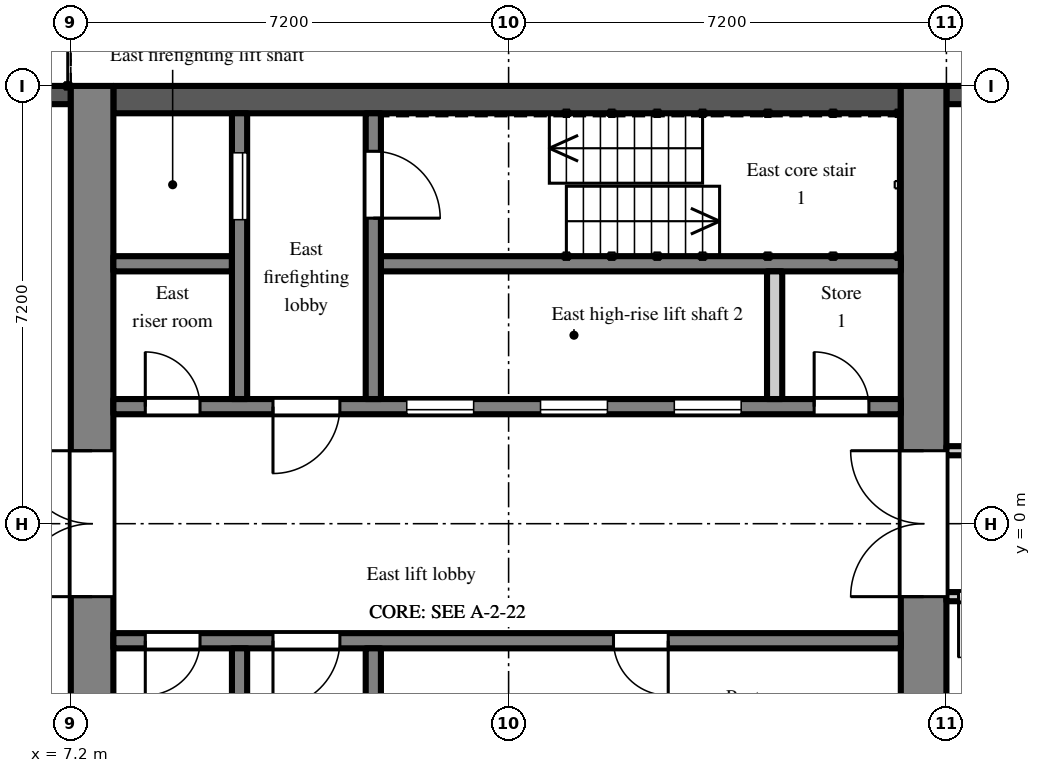
"""IFC4 building model, lengths in metres.
Left out: names, types, materials, properties, quantities, classifications, styles, units other than length and angle.
Written with IfcOpenShell. Run it as: python <this file> out.ifc"""

import sys

from ifc_helpers import new_model, si_unit, direction, frame, frame_2d, origin, place, context, subcontext, project, spatial, rectangle, extrude, element, fill, save


model = new_model("IFC4")
c1 = context("Model", 3, precision=1e-05, world=origin(), true_north=direction((0.0, 1.0)))
c2 = subcontext(c1, "Body", "Model", "MODEL_VIEW")
j1 = project(units=[si_unit("LENGTHUNIT", "METRE"), si_unit("PLANEANGLEUNIT", "RADIAN")], contexts=[c1])
p1 = place(None, origin())
s1 = spatial("IfcSite", under=j1, at=p1, CompositionType="ELEMENT")
p2 = place(p1, origin())
s2 = spatial("IfcBuilding", under=s1, at=p2, CompositionType="ELEMENT")
p3 = place(p2, frame((0.0, 0.0, 129.3)))
s3 = spatial("IfcBuildingStorey", under=s2, at=p3, CompositionType="ELEMENT", Elevation=129.3)
p4 = place(p3, frame((24.3, 7.05, 0.0), z_axis=(0.0, 0.0, 1.0), x_axis=(-1.0, 0.0, 0.0)))
e1 = element("IfcWall", 1, at=p4, inside=s3, PredefinedType="SOLIDWALL", context=c2, shape_type="SweptSolid", body=[
    extrude(rectangle(XDim=2.7, YDim=0.3, at=frame_2d((1.35, 0.0))), origin(), (0.0, 0.0, 1.0), 2.2),
])
p5 = place(p4, frame((0.75, 0.0, 0.2)))
e2 = element("IfcOpeningElement", 2, at=p5, cuts=e1, PredefinedType="OPENING", context=c2, shape_type="SweptSolid", body=[
    extrude(rectangle(XDim=1.2, YDim=1.85, at=frame_2d((0.6, 0.925))), frame((0.0, 0.16, 0.0), z_axis=(0.0, -1.0, 0.0), x_axis=(1.0, 0.0, 0.0)), (0.0, 0.0, 1.0), 0.32),
])
p6 = place(p3, frame((7.2, 7.05, 0.0), z_axis=(0.0, 0.0, 1.0), x_axis=(-1.0, 0.0, 0.0)))
e3 = element("IfcWall", 3, at=p6, inside=s3, PredefinedType="SOLIDWALL", context=c2, shape_type="SweptSolid", body=[
    extrude(rectangle(XDim=3.0, YDim=0.3, at=frame_2d((1.5, 0.0))), origin(), (0.0, 0.0, 1.0), 2.2),
])
p7 = place(p3, frame((7.55, -7.2, 0.0), z_axis=(0.0, 0.0, 1.0), x_axis=(0.0, 1.0, 0.0)))
e4 = element("IfcWall", 4, at=p7, inside=s3, PredefinedType="SHEAR", context=c2, shape_type="SweptSolid", body=[
    extrude(rectangle(XDim=14.4, YDim=0.7, at=frame_2d((7.2, 0.0))), origin(), (0.0, 0.0, 1.0), 2.6),
])
p8 = place(p7, frame((6.0, 0.0, 0.0)))
e5 = element("IfcOpeningElement", 5, at=p8, cuts=e4, PredefinedType="OPENING", context=c2, shape_type="SweptSolid", body=[
    extrude(rectangle(XDim=2.4, YDim=2.2, at=frame_2d((1.2, 1.1))), frame((0.0, 0.36, 0.0), z_axis=(0.0, -1.0, 0.0), x_axis=(1.0, 0.0, 0.0)), (0.0, 0.0, 1.0), 0.72),
])
p9 = place(p3, frame((21.225, -7.2, 0.0), z_axis=(0.0, 0.0, 1.0), x_axis=(0.0, 1.0, 0.0)))
e6 = element("IfcWall", 6, at=p9, inside=s3, PredefinedType="SHEAR", context=c2, shape_type="SweptSolid", body=[
    extrude(rectangle(XDim=14.4, YDim=0.75, at=frame_2d((7.2, 0.0))), origin(), (0.0, 0.0, 1.0), 2.6),
])
p10 = place(p9, frame((6.0, 0.0, 0.0)))
e7 = element("IfcOpeningElement", 7, at=p10, cuts=e6, PredefinedType="OPENING", context=c2, shape_type="SweptSolid", body=[
    extrude(rectangle(XDim=2.4, YDim=2.2, at=frame_2d((1.2, 1.1))), frame((0.0, 0.385, 0.0), z_axis=(0.0, -1.0, 0.0), x_axis=(1.0, 0.0, 0.0)), (0.0, 0.0, 1.0), 0.77),
])
p11 = place(p3, frame((7.9, 6.975, 0.0), z_axis=(0.0, 0.0, 1.0), x_axis=(1.0, 0.0, 0.0)))
e8 = element("IfcWall", 8, at=p11, inside=s3, PredefinedType="SHEAR", context=c2, shape_type="SweptSolid", body=[
    extrude(rectangle(XDim=12.95, YDim=0.45, at=frame_2d((6.475, 0.0))), origin(), (0.0, 0.0, 1.0), 2.6),
])
p12 = place(p3, frame((7.9, 1.925, 0.0), z_axis=(0.0, 0.0, 1.0), x_axis=(1.0, 0.0, 0.0)))
e9 = element("IfcWall", 9, at=p12, inside=s3, PredefinedType="SHEAR", context=c2, shape_type="SweptSolid", body=[
    extrude(rectangle(XDim=12.95, YDim=0.25, at=frame_2d((6.475, 0.0))), origin(), (0.0, 0.0, 1.0), 2.6),
])
p13 = place(p12, frame((4.825, 0.0, 0.0)))
e10 = element("IfcOpeningElement", 10, at=p13, cuts=e9, PredefinedType="OPENING", context=c2, shape_type="SweptSolid", body=[
    extrude(rectangle(XDim=1.1, YDim=2.1, at=frame_2d((0.55, 1.05))), frame((0.0, 0.135, 0.0), z_axis=(0.0, -1.0, 0.0), x_axis=(1.0, 0.0, 0.0)), (0.0, 0.0, 1.0), 0.27),
])
p14 = place(p12, frame((7.025, 0.0, 0.0)))
e11 = element("IfcOpeningElement", 11, at=p14, cuts=e9, PredefinedType="OPENING", context=c2, shape_type="SweptSolid", body=[
    extrude(rectangle(XDim=1.1, YDim=2.1, at=frame_2d((0.55, 1.05))), frame((0.0, 0.135, 0.0), z_axis=(0.0, -1.0, 0.0), x_axis=(1.0, 0.0, 0.0)), (0.0, 0.0, 1.0), 0.27),
])
p15 = place(p12, frame((9.225, 0.0, 0.0)))
e12 = element("IfcOpeningElement", 12, at=p15, cuts=e9, PredefinedType="OPENING", context=c2, shape_type="SweptSolid", body=[
    extrude(rectangle(XDim=1.1, YDim=2.1, at=frame_2d((0.55, 1.05))), frame((0.0, 0.135, 0.0), z_axis=(0.0, -1.0, 0.0), x_axis=(1.0, 0.0, 0.0)), (0.0, 0.0, 1.0), 0.27),
])
p16 = place(p12, frame((0.525, 0.0, 0.0)))
e13 = element("IfcOpeningElement", 13, at=p16, cuts=e9, PredefinedType="OPENING", context=c2, shape_type="SweptSolid", body=[
    extrude(rectangle(XDim=0.9, YDim=2.1, at=frame_2d((0.45, 1.05))), frame((0.0, 0.135, 0.0), z_axis=(0.0, -1.0, 0.0), x_axis=(1.0, 0.0, 0.0)), (0.0, 0.0, 1.0), 0.27),
])
p17 = place(p12, frame((2.625, 0.0, 0.0)))
e14 = element("IfcOpeningElement", 14, at=p17, cuts=e9, PredefinedType="OPENING", context=c2, shape_type="SweptSolid", body=[
    extrude(rectangle(XDim=1.1, YDim=2.1, at=frame_2d((0.55, 1.05))), frame((0.0, 0.135, 0.0), z_axis=(0.0, -1.0, 0.0), x_axis=(1.0, 0.0, 0.0)), (0.0, 0.0, 1.0), 0.27),
])
p18 = place(p12, frame((11.525, 0.0, 0.0)))
e15 = element("IfcOpeningElement", 15, at=p18, cuts=e9, PredefinedType="OPENING", context=c2, shape_type="SweptSolid", body=[
    extrude(rectangle(XDim=0.9, YDim=2.1, at=frame_2d((0.45, 1.05))), frame((0.0, 0.135, 0.0), z_axis=(0.0, -1.0, 0.0), x_axis=(1.0, 0.0, 0.0)), (0.0, 0.0, 1.0), 0.27),
])
p19 = place(p3, frame((7.9, 4.275, 0.0), z_axis=(0.0, 0.0, 1.0), x_axis=(1.0, 0.0, 0.0)))
e16 = element("IfcWall", 16, at=p19, inside=s3, PredefinedType="SHEAR", context=c2, shape_type="SweptSolid", body=[
    extrude(rectangle(XDim=1.95, YDim=0.25, at=frame_2d((0.975, 0.0))), origin(), (0.0, 0.0, 1.0), 2.6),
])
p20 = place(p3, frame((12.3, 4.275, 0.0), z_axis=(0.0, 0.0, 1.0), x_axis=(1.0, 0.0, 0.0)))
e17 = element("IfcWall", 17, at=p20, inside=s3, PredefinedType="SHEAR", context=c2, shape_type="SweptSolid", body=[
    extrude(rectangle(XDim=8.55, YDim=0.25, at=frame_2d((4.275, 0.0))), origin(), (0.0, 0.0, 1.0), 2.6),
])
p21 = place(p3, frame((9.975, 2.05, 0.0), z_axis=(0.0, 0.0, 1.0), x_axis=(0.0, 1.0, 0.0)))
e18 = element("IfcWall", 18, at=p21, inside=s3, PredefinedType="SHEAR", context=c2, shape_type="SweptSolid", body=[
    extrude(rectangle(XDim=4.7, YDim=0.25, at=frame_2d((2.35, 0.0))), origin(), (0.0, 0.0, 1.0), 2.6),
])
p22 = place(p21, frame((2.95, 0.0, 0.0)))
e19 = element("IfcOpeningElement", 19, at=p22, cuts=e18, PredefinedType="OPENING", context=c2, shape_type="SweptSolid", body=[
    extrude(rectangle(XDim=1.1, YDim=2.1, at=frame_2d((0.55, 1.05))), frame((0.0, 0.135, 0.0), z_axis=(0.0, -1.0, 0.0), x_axis=(1.0, 0.0, 0.0)), (0.0, 0.0, 1.0), 0.27),
])
p23 = place(p3, frame((12.175, 2.05, 0.0), z_axis=(0.0, 0.0, 1.0), x_axis=(0.0, 1.0, 0.0)))
e20 = element("IfcWall", 20, at=p23, inside=s3, PredefinedType="SHEAR", context=c2, shape_type="SweptSolid", body=[
    extrude(rectangle(XDim=4.7, YDim=0.25, at=frame_2d((2.35, 0.0))), origin(), (0.0, 0.0, 1.0), 2.6),
])
p24 = place(p23, frame((2.975, 0.0, 0.0)))
e21 = element("IfcOpeningElement", 21, at=p24, cuts=e20, PredefinedType="OPENING", context=c2, shape_type="SweptSolid", body=[
    extrude(rectangle(XDim=1.1, YDim=2.1, at=frame_2d((0.55, 1.05))), frame((0.0, 0.135, 0.0), z_axis=(0.0, -1.0, 0.0), x_axis=(1.0, 0.0, 0.0)), (0.0, 0.0, 1.0), 0.27),
])
p25 = place(p3, frame((18.775, 2.05, 0.0), z_axis=(0.0, 0.0, 1.0), x_axis=(0.0, 1.0, 0.0)))
e22 = element("IfcWall", 22, at=p25, inside=s3, PredefinedType="PARTITIONING", context=c2, shape_type="SweptSolid", body=[
    extrude(rectangle(XDim=2.1, YDim=0.25, at=frame_2d((1.05, 0.0))), origin(), (0.0, 0.0, 1.0), 2.6),
])
p26 = place(p3, frame((7.9, -1.925, 0.0), z_axis=(0.0, 0.0, 1.0), x_axis=(1.0, 0.0, 0.0)))
e23 = element("IfcWall", 23, at=p26, inside=s3, PredefinedType="SHEAR", context=c2, shape_type="SweptSolid", body=[
    extrude(rectangle(XDim=12.95, YDim=0.25, at=frame_2d((6.475, 0.0))), origin(), (0.0, 0.0, 1.0), 2.6),
])
p27 = place(p26, frame((0.525, 0.0, 0.0)))
e24 = element("IfcOpeningElement", 24, at=p27, cuts=e23, PredefinedType="OPENING", context=c2, shape_type="SweptSolid", body=[
    extrude(rectangle(XDim=0.9, YDim=2.1, at=frame_2d((0.45, 1.05))), frame((0.0, 0.135, 0.0), z_axis=(0.0, -1.0, 0.0), x_axis=(1.0, 0.0, 0.0)), (0.0, 0.0, 1.0), 0.27),
])
p28 = place(p26, frame((2.625, 0.0, 0.0)))
e25 = element("IfcOpeningElement", 25, at=p28, cuts=e23, PredefinedType="OPENING", context=c2, shape_type="SweptSolid", body=[
    extrude(rectangle(XDim=1.1, YDim=2.1, at=frame_2d((0.55, 1.05))), frame((0.0, 0.135, 0.0), z_axis=(0.0, -1.0, 0.0), x_axis=(1.0, 0.0, 0.0)), (0.0, 0.0, 1.0), 0.27),
])
p29 = place(p26, frame((8.225, 0.0, 0.0)))
e26 = element("IfcOpeningElement", 26, at=p29, cuts=e23, PredefinedType="OPENING", context=c2, shape_type="SweptSolid", body=[
    extrude(rectangle(XDim=0.9, YDim=2.1, at=frame_2d((0.45, 1.05))), frame((0.0, 0.135, 0.0), z_axis=(0.0, -1.0, 0.0), x_axis=(1.0, 0.0, 0.0)), (0.0, 0.0, 1.0), 0.27),
])
p30 = place(p3, frame((9.975, -2.05, 0.0), z_axis=(0.0, 0.0, 1.0), x_axis=(0.0, -1.0, 0.0)))
e27 = element("IfcWall", 27, at=p30, inside=s3, PredefinedType="SHEAR", context=c2, shape_type="SweptSolid", body=[
    extrude(rectangle(XDim=4.7, YDim=0.25, at=frame_2d((2.35, 0.0))), origin(), (0.0, 0.0, 1.0), 2.6),
])
p31 = place(p30, frame((2.95, 0.0, 0.0)))
e28 = element("IfcOpeningElement", 28, at=p31, cuts=e27, PredefinedType="OPENING", context=c2, shape_type="SweptSolid", body=[
    extrude(rectangle(XDim=1.1, YDim=2.1, at=frame_2d((0.55, 1.05))), frame((0.0, 0.135, 0.0), z_axis=(0.0, -1.0, 0.0), x_axis=(1.0, 0.0, 0.0)), (0.0, 0.0, 1.0), 0.27),
])
p32 = place(p3, frame((12.175, -2.05, 0.0), z_axis=(0.0, 0.0, 1.0), x_axis=(0.0, -1.0, 0.0)))
e29 = element("IfcWall", 29, at=p32, inside=s3, PredefinedType="SHEAR", context=c2, shape_type="SweptSolid", body=[
    extrude(rectangle(XDim=4.7, YDim=0.25, at=frame_2d((2.35, 0.0))), origin(), (0.0, 0.0, 1.0), 2.6),
])
p33 = place(p32, frame((2.975, 0.0, 0.0)))
e30 = element("IfcOpeningElement", 30, at=p33, cuts=e29, PredefinedType="OPENING", context=c2, shape_type="SweptSolid", body=[
    extrude(rectangle(XDim=1.1, YDim=2.1, at=frame_2d((0.55, 1.05))), frame((0.0, 0.135, 0.0), z_axis=(0.0, -1.0, 0.0), x_axis=(1.0, 0.0, 0.0)), (0.0, 0.0, 1.0), 0.27),
])
p34 = place(p3, frame((21.6, -1.2, 0.0), z_axis=(0.0, 0.0, 1.0), x_axis=(1.0, 0.0, 0.0)))
e31 = element("IfcWall", 31, at=p34, inside=s3, PredefinedType="PARTITIONING", context=c2, shape_type="SweptSolid", body=[
    extrude(rectangle(XDim=14.9, YDim=0.15, at=frame_2d((7.45, 0.0))), origin(), (0.0, 0.0, 1.0), 2.6),
])
p35 = place(p34, frame((0.2, 0.0, 0.0)))
e32 = element("IfcOpeningElement", 32, at=p35, cuts=e31, PredefinedType="OPENING", context=c2, shape_type="SweptSolid", body=[
    extrude(rectangle(XDim=1.0, YDim=2.1, at=frame_2d((0.5, 1.05))), frame((0.0, 0.085, 0.0), z_axis=(0.0, -1.0, 0.0), x_axis=(1.0, 0.0, 0.0)), (0.0, 0.0, 1.0), 0.17),
])
p36 = place(p34, frame((5.71, 0.0, 0.0)))
e33 = element("IfcOpeningElement", 33, at=p36, cuts=e31, PredefinedType="OPENING", context=c2, shape_type="SweptSolid", body=[
    extrude(rectangle(XDim=1.0, YDim=2.1, at=frame_2d((0.5, 1.05))), frame((0.0, 0.085, 0.0), z_axis=(0.0, -1.0, 0.0), x_axis=(1.0, 0.0, 0.0)), (0.0, 0.0, 1.0), 0.17),
])
p37 = place(p34, frame((11.95, 0.0, 0.0)))
e34 = element("IfcOpeningElement", 34, at=p37, cuts=e31, PredefinedType="OPENING", context=c2, shape_type="SweptSolid", body=[
    extrude(rectangle(XDim=1.8, YDim=2.1, at=frame_2d((0.9, 1.05))), frame((0.0, 0.085, 0.0), z_axis=(0.0, -1.0, 0.0), x_axis=(1.0, 0.0, 0.0)), (0.0, 0.0, 1.0), 0.17),
])
p38 = place(p3, frame((21.6, 1.2, 0.0), z_axis=(0.0, 0.0, 1.0), x_axis=(1.0, 0.0, 0.0)))
e35 = element("IfcWall", 35, at=p38, inside=s3, PredefinedType="PARTITIONING", context=c2, shape_type="SweptSolid", body=[
    extrude(rectangle(XDim=14.9, YDim=0.15, at=frame_2d((7.45, 0.0))), origin(), (0.0, 0.0, 1.0), 2.6),
])
p39 = place(p38, frame((0.6, 0.0, 0.0)))
e36 = element("IfcOpeningElement", 36, at=p39, cuts=e35, PredefinedType="OPENING", context=c2, shape_type="SweptSolid", body=[
    extrude(rectangle(XDim=1.0, YDim=2.1, at=frame_2d((0.5, 1.05))), frame((0.0, 0.085, 0.0), z_axis=(0.0, -1.0, 0.0), x_axis=(1.0, 0.0, 0.0)), (0.0, 0.0, 1.0), 0.17),
])
p40 = place(p38, frame((6.3, 0.0, 0.0)))
e37 = element("IfcOpeningElement", 37, at=p40, cuts=e35, PredefinedType="OPENING", context=c2, shape_type="SweptSolid", body=[
    extrude(rectangle(XDim=1.8, YDim=2.1, at=frame_2d((0.9, 1.05))), frame((0.0, 0.085, 0.0), z_axis=(0.0, -1.0, 0.0), x_axis=(1.0, 0.0, 0.0)), (0.0, 0.0, 1.0), 0.17),
])
p41 = place(p38, frame((11.95, 0.0, 0.0)))
e38 = element("IfcOpeningElement", 38, at=p41, cuts=e35, PredefinedType="OPENING", context=c2, shape_type="SweptSolid", body=[
    extrude(rectangle(XDim=1.8, YDim=2.1, at=frame_2d((0.9, 1.05))), frame((0.0, 0.085, 0.0), z_axis=(0.0, -1.0, 0.0), x_axis=(1.0, 0.0, 0.0)), (0.0, 0.0, 1.0), 0.17),
])
p42 = place(p13, origin())
e39 = element("IfcDoor", 39, at=p42, inside=s3, OperationType="SLIDING_TO_LEFT", PredefinedType="DOOR", context=c2, shape_type="SweptSolid", body=[
    extrude(rectangle(XDim=1.1, YDim=2.1, at=frame_2d((0.55, 1.05))), frame((0.0, 0.025, 0.0), z_axis=(0.0, -1.0, 0.0), x_axis=(1.0, 0.0, 0.0)), (0.0, 0.0, 1.0), 0.05),
])
fill(e10, e39)
p43 = place(p14, origin())
e40 = element("IfcDoor", 40, at=p43, inside=s3, OperationType="SLIDING_TO_LEFT", PredefinedType="DOOR", context=c2, shape_type="SweptSolid", body=[
    extrude(rectangle(XDim=1.1, YDim=2.1, at=frame_2d((0.55, 1.05))), frame((0.0, 0.025, 0.0), z_axis=(0.0, -1.0, 0.0), x_axis=(1.0, 0.0, 0.0)), (0.0, 0.0, 1.0), 0.05),
])
fill(e11, e40)
p44 = place(p15, origin())
e41 = element("IfcDoor", 41, at=p44, inside=s3, OperationType="SLIDING_TO_LEFT", PredefinedType="DOOR", context=c2, shape_type="SweptSolid", body=[
    extrude(rectangle(XDim=1.1, YDim=2.1, at=frame_2d((0.55, 1.05))), frame((0.0, 0.025, 0.0), z_axis=(0.0, -1.0, 0.0), x_axis=(1.0, 0.0, 0.0)), (0.0, 0.0, 1.0), 0.05),
])
fill(e12, e41)
p45 = place(p22, origin())
e42 = element("IfcDoor", 42, at=p45, inside=s3, OperationType="SLIDING_TO_LEFT", PredefinedType="DOOR", context=c2, shape_type="SweptSolid", body=[
    extrude(rectangle(XDim=1.1, YDim=2.1, at=frame_2d((0.55, 1.05))), frame((0.0, 0.025, 0.0), z_axis=(0.0, -1.0, 0.0), x_axis=(1.0, 0.0, 0.0)), (0.0, 0.0, 1.0), 0.05),
])
fill(e19, e42)
p46 = place(p24, frame((1.1, 0.0, 0.0), z_axis=(0.0, 0.0, 1.0), x_axis=(-1.0, 0.0, 0.0)))
e43 = element("IfcDoor", 43, at=p46, inside=s3, OperationType="SINGLE_SWING_RIGHT", PredefinedType="DOOR", context=c2, shape_type="SweptSolid", body=[
    extrude(rectangle(XDim=1.1, YDim=2.1, at=frame_2d((0.55, 1.05))), frame((0.0, 0.025, 0.0), z_axis=(0.0, -1.0, 0.0), x_axis=(1.0, 0.0, 0.0)), (0.0, 0.0, 1.0), 0.05),
])
fill(e21, e43)
p47 = place(p16, origin())
e44 = element("IfcDoor", 44, at=p47, inside=s3, OperationType="SINGLE_SWING_LEFT", PredefinedType="DOOR", context=c2, shape_type="SweptSolid", body=[
    extrude(rectangle(XDim=0.9, YDim=2.1, at=frame_2d((0.45, 1.05))), frame((0.0, 0.025, 0.0), z_axis=(0.0, -1.0, 0.0), x_axis=(1.0, 0.0, 0.0)), (0.0, 0.0, 1.0), 0.05),
])
fill(e13, e44)
p48 = place(p27, frame((0.9, 0.0, 0.0), z_axis=(0.0, 0.0, 1.0), x_axis=(-1.0, 0.0, 0.0)))
e45 = element("IfcDoor", 45, at=p48, inside=s3, OperationType="SINGLE_SWING_RIGHT", PredefinedType="DOOR", context=c2, shape_type="SweptSolid", body=[
    extrude(rectangle(XDim=0.9, YDim=2.1, at=frame_2d((0.45, 1.05))), frame((0.0, 0.025, 0.0), z_axis=(0.0, -1.0, 0.0), x_axis=(1.0, 0.0, 0.0)), (0.0, 0.0, 1.0), 0.05),
])
fill(e24, e45)
p49 = place(p17, frame((1.1, 0.0, 0.0), z_axis=(0.0, 0.0, 1.0), x_axis=(-1.0, 0.0, 0.0)))
e46 = element("IfcDoor", 46, at=p49, inside=s3, OperationType="SINGLE_SWING_RIGHT", PredefinedType="DOOR", context=c2, shape_type="SweptSolid", body=[
    extrude(rectangle(XDim=1.1, YDim=2.1, at=frame_2d((0.55, 1.05))), frame((0.0, 0.025, 0.0), z_axis=(0.0, -1.0, 0.0), x_axis=(1.0, 0.0, 0.0)), (0.0, 0.0, 1.0), 0.05),
])
fill(e14, e46)
p50 = place(p28, frame((1.1, 0.0, 0.0), z_axis=(0.0, 0.0, 1.0), x_axis=(-1.0, 0.0, 0.0)))
e47 = element("IfcDoor", 47, at=p50, inside=s3, OperationType="SINGLE_SWING_RIGHT", PredefinedType="DOOR", context=c2, shape_type="SweptSolid", body=[
    extrude(rectangle(XDim=1.1, YDim=2.1, at=frame_2d((0.55, 1.05))), frame((0.0, 0.025, 0.0), z_axis=(0.0, -1.0, 0.0), x_axis=(1.0, 0.0, 0.0)), (0.0, 0.0, 1.0), 0.05),
])
fill(e25, e47)
p51 = place(p8, origin())
e48 = element("IfcDoor", 48, at=p51, inside=s3, OperationType="DOUBLE_DOOR_DOUBLE_SWING", PredefinedType="DOOR", context=c2, shape_type="SweptSolid", body=[
    extrude(rectangle(XDim=2.4, YDim=2.2, at=frame_2d((1.2, 1.1))), frame((0.0, 0.025, 0.0), z_axis=(0.0, -1.0, 0.0), x_axis=(1.0, 0.0, 0.0)), (0.0, 0.0, 1.0), 0.05),
])
fill(e5, e48)
p52 = place(p10, origin())
e49 = element("IfcDoor", 49, at=p52, inside=s3, OperationType="DOUBLE_DOOR_DOUBLE_SWING", PredefinedType="DOOR", context=c2, shape_type="SweptSolid", body=[
    extrude(rectangle(XDim=2.4, YDim=2.2, at=frame_2d((1.2, 1.1))), frame((0.0, 0.025, 0.0), z_axis=(0.0, -1.0, 0.0), x_axis=(1.0, 0.0, 0.0)), (0.0, 0.0, 1.0), 0.05),
])
fill(e7, e49)
p53 = place(p18, origin())
e50 = element("IfcDoor", 50, at=p53, inside=s3, OperationType="SINGLE_SWING_LEFT", PredefinedType="DOOR", context=c2, shape_type="SweptSolid", body=[
    extrude(rectangle(XDim=0.9, YDim=2.1, at=frame_2d((0.45, 1.05))), frame((0.0, 0.025, 0.0), z_axis=(0.0, -1.0, 0.0), x_axis=(1.0, 0.0, 0.0)), (0.0, 0.0, 1.0), 0.05),
])
fill(e15, e50)
p54 = place(p29, frame((0.9, 0.0, 0.0), z_axis=(0.0, 0.0, 1.0), x_axis=(-1.0, 0.0, 0.0)))
e51 = element("IfcDoor", 51, at=p54, inside=s3, OperationType="SINGLE_SWING_LEFT", PredefinedType="DOOR", context=c2, shape_type="SweptSolid", body=[
    extrude(rectangle(XDim=0.9, YDim=2.1, at=frame_2d((0.45, 1.05))), frame((0.0, 0.025, 0.0), z_axis=(0.0, -1.0, 0.0), x_axis=(1.0, 0.0, 0.0)), (0.0, 0.0, 1.0), 0.05),
])
fill(e26, e51)
p55 = place(p35, frame((1.0, 0.0, 0.0), z_axis=(0.0, 0.0, 1.0), x_axis=(-1.0, 0.0, 0.0)))
e52 = element("IfcDoor", 52, at=p55, inside=s3, OperationType="SINGLE_SWING_RIGHT", PredefinedType="DOOR", context=c2, shape_type="SweptSolid", body=[
    extrude(rectangle(XDim=1.0, YDim=2.1, at=frame_2d((0.5, 1.05))), frame((0.0, 0.025, 0.0), z_axis=(0.0, -1.0, 0.0), x_axis=(1.0, 0.0, 0.0)), (0.0, 0.0, 1.0), 0.05),
])
fill(e32, e52)
save(model, sys.argv[1])
